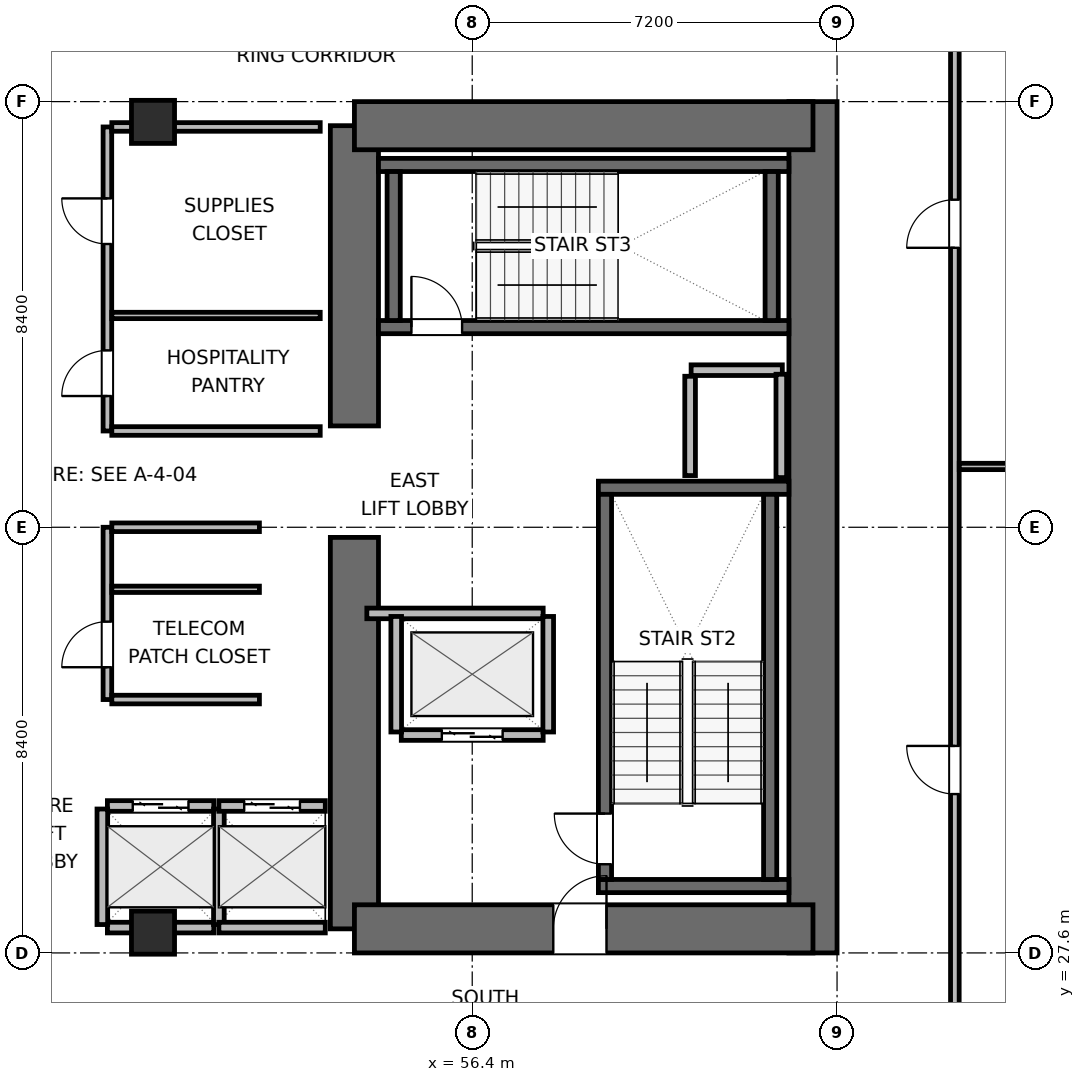
"""IFC4 building model, lengths in metres.
Left out: names, types, materials, properties, quantities, classifications, styles, units other than length and angle.
Written with IfcOpenShell. Run it as: python <this file> out.ifc"""

import sys

from ifc_helpers import new_model, si_unit, direction, frame, frame_2d, origin, origin_2d, place, context, subcontext, project, spatial, rectangle, extrude, element, fill, save


model = new_model("IFC4")
c1 = context("Model", 3, precision=1e-05, world=origin(), true_north=direction((0.0, 1.0)))
c2 = subcontext(c1, "Body", "Model", "MODEL_VIEW")
j1 = project(units=[si_unit("LENGTHUNIT", "METRE"), si_unit("PLANEANGLEUNIT", "RADIAN")], contexts=[c1])
p1 = place(None, origin())
s1 = spatial("IfcSite", under=j1, at=p1, CompositionType="ELEMENT")
p2 = place(p1, origin())
s2 = spatial("IfcBuilding", under=s1, at=p2, CompositionType="ELEMENT")
p3 = place(p2, frame((0.0, 0.0, 41.1)))
s3 = spatial("IfcBuildingStorey", under=s2, at=p3, CompositionType="ELEMENT", Elevation=41.1)
p4 = place(p3, frame((54.075, 28.075, 0.0), z_axis=(0.0, 0.0, 1.0), x_axis=(0.0, 1.0, 0.0)))
e1 = element("IfcWall", 1, at=p4, inside=s3, PredefinedType="SHEAR", context=c2, shape_type="SweptSolid", body=[
    extrude(rectangle(XDim=7.725, YDim=0.95, at=frame_2d((3.863, 0.0))), origin(), (0.0, 0.0, 1.0), 3.9),
])
p5 = place(p3, frame((54.075, 38.0, 0.0), z_axis=(0.0, 0.0, 1.0), x_axis=(0.0, 1.0, 0.0)))
e2 = element("IfcWall", 2, at=p5, inside=s3, PredefinedType="SHEAR", context=c2, shape_type="SweptSolid", body=[
    extrude(rectangle(XDim=5.925, YDim=0.95, at=frame_2d((2.962, 0.0))), origin(), (0.0, 0.0, 1.0), 3.9),
])
p6 = place(p3, frame((63.125, 27.6, 0.0), z_axis=(0.0, 0.0, 1.0), x_axis=(0.0, 1.0, 0.0)))
e3 = element("IfcWall", 3, at=p6, inside=s3, PredefinedType="SHEAR", context=c2, shape_type="SweptSolid", body=[
    extrude(rectangle(XDim=16.8, YDim=0.95, at=frame_2d((8.4, 0.0))), origin(), (0.0, 0.0, 1.0), 3.9),
])
p7 = place(p3, frame((54.075, 28.075, 0.0), z_axis=(0.0, 0.0, 1.0), x_axis=(1.0, 0.0, 0.0)))
e4 = element("IfcWall", 4, at=p7, inside=s3, PredefinedType="SHEAR", context=c2, shape_type="SweptSolid", body=[
    extrude(rectangle(XDim=9.05, YDim=0.95, at=frame_2d((4.525, 0.0))), origin(), (0.0, 0.0, 1.0), 3.9),
])
p8 = place(p7, frame((3.925, 0.0, 0.0)))
e5 = element("IfcOpeningElement", 5, at=p8, cuts=e4, PredefinedType="OPENING", context=c2, shape_type="SweptSolid", body=[
    extrude(rectangle(XDim=1.05, YDim=2.04, at=frame_2d((0.525, 1.02))), frame((0.0, 0.485, 0.0), z_axis=(0.0, -1.0, 0.0), x_axis=(1.0, 0.0, 0.0)), (0.0, 0.0, 1.0), 0.97),
])
p9 = place(p3, frame((54.075, 43.925, 0.0), z_axis=(0.0, 0.0, 1.0), x_axis=(1.0, 0.0, 0.0)))
e6 = element("IfcWall", 6, at=p9, inside=s3, PredefinedType="SHEAR", context=c2, shape_type="SweptSolid", body=[
    extrude(rectangle(XDim=9.05, YDim=0.95, at=frame_2d((4.525, 0.0))), origin(), (0.0, 0.0, 1.0), 3.9),
])
for number, where, z_axis, x_axis in (
    (7, (58.89, 28.92, 0.0), (0.0, 0.0, 1.0), (1.0, 0.0, 0.0)),
    (8, (58.89, 36.78, 0.0), (0.0, 0.0, 1.0), (1.0, 0.0, 0.0)),
):
    element("IfcWall", number, at=place(p3, frame(where, z_axis=z_axis, x_axis=x_axis)), inside=s3, PredefinedType="SHEAR", context=c2, shape_type="SweptSolid", body=[
        extrude(rectangle(XDim=3.76, YDim=0.26, at=frame_2d((1.88, 0.0))), origin(), (0.0, 0.0, 1.0), 3.9),
    ])
p10 = place(p3, frame((59.02, 29.05, 0.0), z_axis=(0.0, 0.0, 1.0), x_axis=(0.0, 1.0, 0.0)))
e9 = element("IfcWall", 9, at=p10, inside=s3, PredefinedType="SHEAR", context=c2, shape_type="SweptSolid", body=[
    extrude(rectangle(XDim=7.6, YDim=0.26, at=frame_2d((3.8, 0.0))), origin(), (0.0, 0.0, 1.0), 3.9),
])
p11 = place(p10, frame((0.3, 0.0, 0.0)))
e10 = element("IfcOpeningElement", 10, at=p11, cuts=e9, PredefinedType="OPENING", context=c2, shape_type="SweptSolid", body=[
    extrude(rectangle(XDim=1.0, YDim=2.04, at=frame_2d((0.5, 1.02))), frame((0.0, 0.14, 0.0), z_axis=(0.0, -1.0, 0.0), x_axis=(1.0, 0.0, 0.0)), (0.0, 0.0, 1.0), 0.28),
])
p12 = place(p3, frame((62.28, 29.05, 0.0), z_axis=(0.0, 0.0, 1.0), x_axis=(0.0, 1.0, 0.0)))
e11 = element("IfcWall", 11, at=p12, inside=s3, PredefinedType="SHEAR", context=c2, shape_type="SweptSolid", body=[
    extrude(rectangle(XDim=7.6, YDim=0.26, at=frame_2d((3.8, 0.0))), origin(), (0.0, 0.0, 1.0), 3.9),
])
p13 = place(p3, frame((54.55, 39.95, 0.0), z_axis=(0.0, 0.0, 1.0), x_axis=(1.0, 0.0, 0.0)))
e12 = element("IfcWall", 12, at=p13, inside=s3, PredefinedType="SHEAR", context=c2, shape_type="SweptSolid", body=[
    extrude(rectangle(XDim=8.1, YDim=0.26, at=frame_2d((4.05, 0.0))), origin(), (0.0, 0.0, 1.0), 3.9),
])
p14 = place(p13, frame((0.65, 0.0, 0.0)))
e13 = element("IfcOpeningElement", 13, at=p14, cuts=e12, PredefinedType="OPENING", context=c2, shape_type="SweptSolid", body=[
    extrude(rectangle(XDim=1.0, YDim=2.04, at=frame_2d((0.5, 1.02))), frame((0.0, 0.14, 0.0), z_axis=(0.0, -1.0, 0.0), x_axis=(1.0, 0.0, 0.0)), (0.0, 0.0, 1.0), 0.28),
])
p15 = place(p3, frame((54.55, 43.15, 0.0), z_axis=(0.0, 0.0, 1.0), x_axis=(1.0, 0.0, 0.0)))
e14 = element("IfcWall", 14, at=p15, inside=s3, PredefinedType="SHEAR", context=c2, shape_type="SweptSolid", body=[
    extrude(rectangle(XDim=8.1, YDim=0.26, at=frame_2d((4.05, 0.0))), origin(), (0.0, 0.0, 1.0), 3.9),
])
for number, where, z_axis, x_axis in (
    (15, (54.85, 40.08, 0.0), (0.0, 0.0, 1.0), (0.0, 1.0, 0.0)),
    (16, (62.31, 40.08, 0.0), (0.0, 0.0, 1.0), (0.0, 1.0, 0.0)),
):
    element("IfcWall", number, at=place(p3, frame(where, z_axis=z_axis, x_axis=x_axis)), inside=s3, PredefinedType="SHEAR", context=c2, shape_type="SweptSolid", body=[
        extrude(rectangle(XDim=2.94, YDim=0.26, at=frame_2d((1.47, 0.0))), origin(), (0.0, 0.0, 1.0), 3.9),
    ])
for number, where, z_axis, x_axis in (
    (17, (50.1, 28.0, 0.0), (0.0, 0.0, 1.0), (1.0, 0.0, 0.0)),
    (18, (50.1, 44.0, 0.0), (0.0, 0.0, 1.0), (1.0, 0.0, 0.0)),
):
    element("IfcColumn", number, at=place(p3, frame(where, z_axis=z_axis, x_axis=x_axis)), inside=s3, PredefinedType="COLUMN", context=c2, shape_type="SweptSolid", body=[
        extrude(rectangle(XDim=0.85, YDim=0.85, at=origin_2d()), origin(), (0.0, 0.0, 1.0), 3.9),
    ])
p16 = place(p3, frame((60.72, 39.1, 0.0), z_axis=(0.0, 0.0, 1.0), x_axis=(1.0, 0.0, 0.0)))
e19 = element("IfcWall", 19, at=p16, inside=s3, PredefinedType="PARTITIONING", context=c2, shape_type="SweptSolid", body=[
    extrude(rectangle(XDim=1.8, YDim=0.21, at=frame_2d((0.9, 0.0))), origin(), (0.0, 0.0, 1.0), 3.64),
])
p17 = place(p3, frame((60.7, 37.02, 0.0), z_axis=(0.0, 0.0, 1.0), x_axis=(0.0, 1.0, 0.0)))
e20 = element("IfcWall", 20, at=p17, inside=s3, PredefinedType="PARTITIONING", context=c2, shape_type="SweptSolid", body=[
    extrude(rectangle(XDim=1.96, YDim=0.21, at=frame_2d((0.98, 0.0))), origin(), (0.0, 0.0, 1.0), 3.64),
])
p18 = place(p3, frame((62.5, 36.98, 0.0), z_axis=(0.0, 0.0, 1.0), x_axis=(0.0, 1.0, 0.0)))
e21 = element("IfcWall", 21, at=p18, inside=s3, PredefinedType="PARTITIONING", context=c2, shape_type="SweptSolid", body=[
    extrude(rectangle(XDim=2.04, YDim=0.21, at=frame_2d((1.02, 0.0))), origin(), (0.0, 0.0, 1.0), 3.64),
])
p19 = place(p3, frame((55.0, 31.9, 0.0), z_axis=(0.0, 0.0, 1.0), x_axis=(1.0, 0.0, 0.0)))
e22 = element("IfcWall", 22, at=p19, inside=s3, PredefinedType="PARTITIONING", context=c2, shape_type="SweptSolid", body=[
    extrude(rectangle(XDim=2.8, YDim=0.21, at=frame_2d((1.4, 0.0))), origin(), (0.0, 0.0, 1.0), 3.64),
])
p20 = place(p19, frame((0.8, 0.0, 0.0)))
e23 = element("IfcOpeningElement", 23, at=p20, cuts=e22, PredefinedType="OPENING", context=c2, shape_type="SweptSolid", body=[
    extrude(rectangle(XDim=1.2, YDim=2.04, at=frame_2d((0.6, 1.02))), frame((0.0, 0.115, 0.0), z_axis=(0.0, -1.0, 0.0), x_axis=(1.0, 0.0, 0.0)), (0.0, 0.0, 1.0), 0.23),
])
p21 = place(p3, frame((54.32, 34.3, 0.0), z_axis=(0.0, 0.0, 1.0), x_axis=(1.0, 0.0, 0.0)))
e24 = element("IfcWall", 24, at=p21, inside=s3, PredefinedType="PARTITIONING", context=c2, shape_type="SweptSolid", body=[
    extrude(rectangle(XDim=3.48, YDim=0.21, at=frame_2d((1.74, 0.0))), origin(), (0.0, 0.0, 1.0), 3.64),
])
for number, where, z_axis, x_axis in (
    (25, (54.9, 31.96, 0.0), (0.0, 0.0, 1.0), (0.0, 1.0, 0.0)),
    (26, (57.9, 31.96, 0.0), (0.0, 0.0, 1.0), (0.0, 1.0, 0.0)),
):
    element("IfcWall", number, at=place(p3, frame(where, z_axis=z_axis, x_axis=x_axis)), inside=s3, PredefinedType="PARTITIONING", context=c2, shape_type="SweptSolid", body=[
        extrude(rectangle(XDim=2.28, YDim=0.21, at=frame_2d((1.14, 0.0))), origin(), (0.0, 0.0, 1.0), 3.64),
    ])
p22 = place(p3, frame((49.2, 30.5, 0.0), z_axis=(0.0, 0.0, 1.0), x_axis=(1.0, 0.0, 0.0)))
e27 = element("IfcWall", 27, at=p22, inside=s3, PredefinedType="PARTITIONING", context=c2, shape_type="SweptSolid", body=[
    extrude(rectangle(XDim=2.1, YDim=0.21, at=frame_2d((1.05, 0.0))), origin(), (0.0, 0.0, 1.0), 3.64),
])
p23 = place(p22, frame((0.5, 0.0, 0.0)))
e28 = element("IfcOpeningElement", 28, at=p23, cuts=e27, PredefinedType="OPENING", context=c2, shape_type="SweptSolid", body=[
    extrude(rectangle(XDim=1.1, YDim=2.04, at=frame_2d((0.55, 1.02))), frame((0.0, 0.115, 0.0), z_axis=(0.0, -1.0, 0.0), x_axis=(1.0, 0.0, 0.0)), (0.0, 0.0, 1.0), 0.23),
])
p24 = place(p3, frame((49.2, 28.1, 0.0), z_axis=(0.0, 0.0, 1.0), x_axis=(1.0, 0.0, 0.0)))
e29 = element("IfcWall", 29, at=p24, inside=s3, PredefinedType="PARTITIONING", context=c2, shape_type="SweptSolid", body=[
    extrude(rectangle(XDim=2.1, YDim=0.21, at=frame_2d((1.05, 0.0))), origin(), (0.0, 0.0, 1.0), 2.525),
])
for number, where, z_axis, x_axis in (
    (30, (49.1, 28.16, 0.0), (0.0, 0.0, 1.0), (0.0, 1.0, 0.0)),
    (31, (51.4, 28.16, 0.0), (0.0, 0.0, 1.0), (0.0, 1.0, 0.0)),
):
    element("IfcWall", number, at=place(p3, frame(where, z_axis=z_axis, x_axis=x_axis)), inside=s3, PredefinedType="PARTITIONING", context=c2, shape_type="SweptSolid", body=[
        extrude(rectangle(XDim=2.28, YDim=0.21, at=frame_2d((1.14, 0.0))), origin(), (0.0, 0.0, 1.0), 3.64),
    ])
p25 = place(p3, frame((51.4, 30.5, 0.0), z_axis=(0.0, 0.0, 1.0), x_axis=(1.0, 0.0, 0.0)))
e32 = element("IfcWall", 32, at=p25, inside=s3, PredefinedType="PARTITIONING", context=c2, shape_type="SweptSolid", body=[
    extrude(rectangle(XDim=2.1, YDim=0.21, at=frame_2d((1.05, 0.0))), origin(), (0.0, 0.0, 1.0), 3.64),
])
p26 = place(p25, frame((0.5, 0.0, 0.0)))
e33 = element("IfcOpeningElement", 33, at=p26, cuts=e32, PredefinedType="OPENING", context=c2, shape_type="SweptSolid", body=[
    extrude(rectangle(XDim=1.1, YDim=2.04, at=frame_2d((0.55, 1.02))), frame((0.0, 0.115, 0.0), z_axis=(0.0, -1.0, 0.0), x_axis=(1.0, 0.0, 0.0)), (0.0, 0.0, 1.0), 0.23),
])
p27 = place(p3, frame((51.4, 28.1, 0.0), z_axis=(0.0, 0.0, 1.0), x_axis=(1.0, 0.0, 0.0)))
e34 = element("IfcWall", 34, at=p27, inside=s3, PredefinedType="PARTITIONING", context=c2, shape_type="SweptSolid", body=[
    extrude(rectangle(XDim=2.1, YDim=0.21, at=frame_2d((1.05, 0.0))), origin(), (0.0, 0.0, 1.0), 2.525),
])
p28 = place(p3, frame((49.2, 32.6, 0.0), z_axis=(0.0, 0.0, 1.0), x_axis=(0.0, 1.0, 0.0)))
e35 = element("IfcWall", 35, at=p28, inside=s3, PredefinedType="PARTITIONING", context=c2, shape_type="SweptSolid", body=[
    extrude(rectangle(XDim=3.4, YDim=0.17, at=frame_2d((1.7, 0.0))), origin(), (0.0, 0.0, 1.0), 3.64),
])
p29 = place(p28, frame((0.638, 0.0, 0.0)))
e36 = element("IfcOpeningElement", 36, at=p29, cuts=e35, PredefinedType="OPENING", context=c2, shape_type="SweptSolid", body=[
    extrude(rectangle(XDim=0.9, YDim=2.02, at=frame_2d((0.45, 1.01))), frame((0.0, 0.095, 0.0), z_axis=(0.0, -1.0, 0.0), x_axis=(1.0, 0.0, 0.0)), (0.0, 0.0, 1.0), 0.19),
])
for number, where, z_axis, x_axis in (
    (37, (49.287, 32.6, 0.0), (0.0, 0.0, 1.0), (1.0, 0.0, 0.0)),
    (38, (49.287, 36.0, 0.0), (0.0, 0.0, 1.0), (1.0, 0.0, 0.0)),
):
    element("IfcWall", number, at=place(p3, frame(where, z_axis=z_axis, x_axis=x_axis)), inside=s3, PredefinedType="PARTITIONING", context=c2, shape_type="SweptSolid", body=[
        extrude(rectangle(XDim=2.913, YDim=0.17, at=frame_2d((1.457, 0.0))), origin(), (0.0, 0.0, 1.0), 3.64),
    ])
p30 = place(p3, frame((49.287, 34.776, 0.0), z_axis=(0.0, 0.0, 1.0), x_axis=(1.0, 0.0, 0.0)))
e39 = element("IfcWall", 39, at=p30, inside=s3, PredefinedType="PARTITIONING", context=c2, shape_type="SweptSolid", body=[
    extrude(rectangle(XDim=2.913, YDim=0.125, at=frame_2d((1.457, 0.0))), origin(), (0.0, 0.0, 1.0), 3.64),
])
p31 = place(p3, frame((49.2, 37.9, 0.0), z_axis=(0.0, 0.0, 1.0), x_axis=(0.0, 1.0, 0.0)))
e40 = element("IfcWall", 40, at=p31, inside=s3, PredefinedType="PARTITIONING", context=c2, shape_type="SweptSolid", body=[
    extrude(rectangle(XDim=6.0, YDim=0.17, at=frame_2d((3.0, 0.0))), origin(), (0.0, 0.0, 1.0), 3.64),
])
p32 = place(p31, frame((0.69, 0.0, 0.0)))
e41 = element("IfcOpeningElement", 41, at=p32, cuts=e40, PredefinedType="OPENING", context=c2, shape_type="SweptSolid", body=[
    extrude(rectangle(XDim=0.9, YDim=2.02, at=frame_2d((0.45, 1.01))), frame((0.0, 0.095, 0.0), z_axis=(0.0, -1.0, 0.0), x_axis=(1.0, 0.0, 0.0)), (0.0, 0.0, 1.0), 0.19),
])
p33 = place(p31, frame((3.69, 0.0, 0.0)))
e42 = element("IfcOpeningElement", 42, at=p33, cuts=e40, PredefinedType="OPENING", context=c2, shape_type="SweptSolid", body=[
    extrude(rectangle(XDim=0.9, YDim=2.02, at=frame_2d((0.45, 1.01))), frame((0.0, 0.095, 0.0), z_axis=(0.0, -1.0, 0.0), x_axis=(1.0, 0.0, 0.0)), (0.0, 0.0, 1.0), 0.19),
])
p34 = place(p3, frame((49.287, 37.9, 0.0), z_axis=(0.0, 0.0, 1.0), x_axis=(1.0, 0.0, 0.0)))
e43 = element("IfcWall", 43, at=p34, inside=s3, PredefinedType="PARTITIONING", context=c2, shape_type="SweptSolid", body=[
    extrude(rectangle(XDim=4.113, YDim=0.17, at=frame_2d((2.056, 0.0))), origin(), (0.0, 0.0, 1.0), 3.64),
])
p35 = place(p3, frame((49.287, 43.9, 0.0), z_axis=(0.0, 0.0, 1.0), x_axis=(1.0, 0.0, 0.0)))
e44 = element("IfcWall", 44, at=p35, inside=s3, PredefinedType="PARTITIONING", context=c2, shape_type="SweptSolid", body=[
    extrude(rectangle(XDim=4.113, YDim=0.17, at=frame_2d((2.056, 0.0))), origin(), (0.0, 0.0, 1.0), 2.525),
])
p36 = place(p3, frame((49.287, 40.18, 0.0), z_axis=(0.0, 0.0, 1.0), x_axis=(1.0, 0.0, 0.0)))
e45 = element("IfcWall", 45, at=p36, inside=s3, PredefinedType="PARTITIONING", context=c2, shape_type="SweptSolid", body=[
    extrude(rectangle(XDim=4.113, YDim=0.125, at=frame_2d((2.056, 0.0))), origin(), (0.0, 0.0, 1.0), 3.64),
])
p37 = place(p3, frame((65.925, 25.307, 0.0), z_axis=(0.0, 0.0, 1.0), x_axis=(0.0, 1.0, 0.0)))
e46 = element("IfcWall", 46, at=p37, inside=s3, PredefinedType="PARTITIONING", context=c2, shape_type="SweptSolid", body=[
    extrude(rectangle(XDim=21.386, YDim=0.17, at=frame_2d((10.693, 0.0))), origin(), (0.0, 0.0, 1.0), 3.64),
])
p38 = place(p37, frame((5.428, 0.0, 0.0)))
e47 = element("IfcOpeningElement", 47, at=p38, cuts=e46, PredefinedType="OPENING", context=c2, shape_type="SweptSolid", body=[
    extrude(rectangle(XDim=0.95, YDim=2.04, at=frame_2d((0.475, 1.02))), frame((0.0, 0.095, 0.0), z_axis=(0.0, -1.0, 0.0), x_axis=(1.0, 0.0, 0.0)), (0.0, 0.0, 1.0), 0.19),
])
p39 = place(p37, frame((16.208, 0.0, 0.0)))
e48 = element("IfcOpeningElement", 48, at=p39, cuts=e46, PredefinedType="OPENING", context=c2, shape_type="SweptSolid", body=[
    extrude(rectangle(XDim=0.95, YDim=2.04, at=frame_2d((0.475, 1.02))), frame((0.0, 0.095, 0.0), z_axis=(0.0, -1.0, 0.0), x_axis=(1.0, 0.0, 0.0)), (0.0, 0.0, 1.0), 0.19),
])
p40 = place(p3, frame((66.012, 37.2, 0.0), z_axis=(0.0, 0.0, 1.0), x_axis=(1.0, 0.0, 0.0)))
e49 = element("IfcWall", 49, at=p40, inside=s3, PredefinedType="PARTITIONING", context=c2, shape_type="SweptSolid", body=[
    extrude(rectangle(XDim=12.943, YDim=0.125, at=frame_2d((6.472, 0.0))), origin(), (0.0, 0.0, 1.0), 3.64),
])
p41 = place(p11, origin())
e50 = element("IfcDoor", 50, at=p41, inside=s3, OperationType="SINGLE_SWING_RIGHT", PredefinedType="DOOR", context=c2, shape_type="SweptSolid", body=[
    extrude(rectangle(XDim=1.0, YDim=2.04, at=frame_2d((0.5, 1.02))), frame((0.0, 0.025, 0.0), z_axis=(0.0, -1.0, 0.0), x_axis=(1.0, 0.0, 0.0)), (0.0, 0.0, 1.0), 0.05),
])
fill(e10, e50)
p42 = place(p14, origin())
e51 = element("IfcDoor", 51, at=p42, inside=s3, OperationType="SINGLE_SWING_LEFT", PredefinedType="DOOR", context=c2, shape_type="SweptSolid", body=[
    extrude(rectangle(XDim=1.0, YDim=2.04, at=frame_2d((0.5, 1.02))), frame((0.0, 0.025, 0.0), z_axis=(0.0, -1.0, 0.0), x_axis=(1.0, 0.0, 0.0)), (0.0, 0.0, 1.0), 0.05),
])
fill(e13, e51)
p43 = place(p20, origin())
e52 = element("IfcDoor", 52, at=p43, inside=s3, OperationType="DOUBLE_DOOR_SLIDING", PredefinedType="DOOR", context=c2, shape_type="SweptSolid", body=[
    extrude(rectangle(XDim=1.2, YDim=2.04, at=frame_2d((0.6, 1.02))), frame((0.0, 0.025, 0.0), z_axis=(0.0, -1.0, 0.0), x_axis=(1.0, 0.0, 0.0)), (0.0, 0.0, 1.0), 0.05),
])
fill(e23, e52)
p44 = place(p23, origin())
e53 = element("IfcDoor", 53, at=p44, inside=s3, OperationType="DOUBLE_DOOR_SLIDING", PredefinedType="DOOR", context=c2, shape_type="SweptSolid", body=[
    extrude(rectangle(XDim=1.1, YDim=2.04, at=frame_2d((0.55, 1.02))), frame((0.0, 0.025, 0.0), z_axis=(0.0, -1.0, 0.0), x_axis=(1.0, 0.0, 0.0)), (0.0, 0.0, 1.0), 0.05),
])
fill(e28, e53)
p45 = place(p26, origin())
e54 = element("IfcDoor", 54, at=p45, inside=s3, OperationType="DOUBLE_DOOR_SLIDING", PredefinedType="DOOR", context=c2, shape_type="SweptSolid", body=[
    extrude(rectangle(XDim=1.1, YDim=2.04, at=frame_2d((0.55, 1.02))), frame((0.0, 0.025, 0.0), z_axis=(0.0, -1.0, 0.0), x_axis=(1.0, 0.0, 0.0)), (0.0, 0.0, 1.0), 0.05),
])
fill(e33, e54)
p46 = place(p8, origin())
e55 = element("IfcDoor", 55, at=p46, inside=s3, OperationType="SINGLE_SWING_RIGHT", PredefinedType="DOOR", context=c2, shape_type="SweptSolid", body=[
    extrude(rectangle(XDim=1.05, YDim=2.04, at=frame_2d((0.525, 1.02))), frame((0.0, 0.025, 0.0), z_axis=(0.0, -1.0, 0.0), x_axis=(1.0, 0.0, 0.0)), (0.0, 0.0, 1.0), 0.05),
])
fill(e5, e55)
p47 = place(p29, origin())
e56 = element("IfcDoor", 56, at=p47, inside=s3, OperationType="SINGLE_SWING_LEFT", PredefinedType="DOOR", context=c2, shape_type="SweptSolid", body=[
    extrude(rectangle(XDim=0.9, YDim=2.02, at=frame_2d((0.45, 1.01))), frame((0.0, 0.025, 0.0), z_axis=(0.0, -1.0, 0.0), x_axis=(1.0, 0.0, 0.0)), (0.0, 0.0, 1.0), 0.05),
])
fill(e36, e56)
p48 = place(p32, origin())
e57 = element("IfcDoor", 57, at=p48, inside=s3, OperationType="SINGLE_SWING_LEFT", PredefinedType="DOOR", context=c2, shape_type="SweptSolid", body=[
    extrude(rectangle(XDim=0.9, YDim=2.02, at=frame_2d((0.45, 1.01))), frame((0.0, 0.025, 0.0), z_axis=(0.0, -1.0, 0.0), x_axis=(1.0, 0.0, 0.0)), (0.0, 0.0, 1.0), 0.05),
])
fill(e41, e57)
p49 = place(p33, origin())
e58 = element("IfcDoor", 58, at=p49, inside=s3, OperationType="SINGLE_SWING_RIGHT", PredefinedType="DOOR", context=c2, shape_type="SweptSolid", body=[
    extrude(rectangle(XDim=0.9, YDim=2.02, at=frame_2d((0.45, 1.01))), frame((0.0, 0.025, 0.0), z_axis=(0.0, -1.0, 0.0), x_axis=(1.0, 0.0, 0.0)), (0.0, 0.0, 1.0), 0.05),
])
fill(e42, e58)
p50 = place(p38, origin())
e59 = element("IfcDoor", 59, at=p50, inside=s3, OperationType="SINGLE_SWING_RIGHT", PredefinedType="DOOR", context=c2, shape_type="SweptSolid", body=[
    extrude(rectangle(XDim=0.95, YDim=2.04, at=frame_2d((0.475, 1.02))), frame((0.0, 0.025, 0.0), z_axis=(0.0, -1.0, 0.0), x_axis=(1.0, 0.0, 0.0)), (0.0, 0.0, 1.0), 0.05),
])
fill(e47, e59)
p51 = place(p39, origin())
e60 = element("IfcDoor", 60, at=p51, inside=s3, OperationType="SINGLE_SWING_LEFT", PredefinedType="DOOR", context=c2, shape_type="SweptSolid", body=[
    extrude(rectangle(XDim=0.95, YDim=2.04, at=frame_2d((0.475, 1.02))), frame((0.0, 0.025, 0.0), z_axis=(0.0, -1.0, 0.0), x_axis=(1.0, 0.0, 0.0)), (0.0, 0.0, 1.0), 0.05),
])
fill(e48, e60)
save(model, sys.argv[1])
